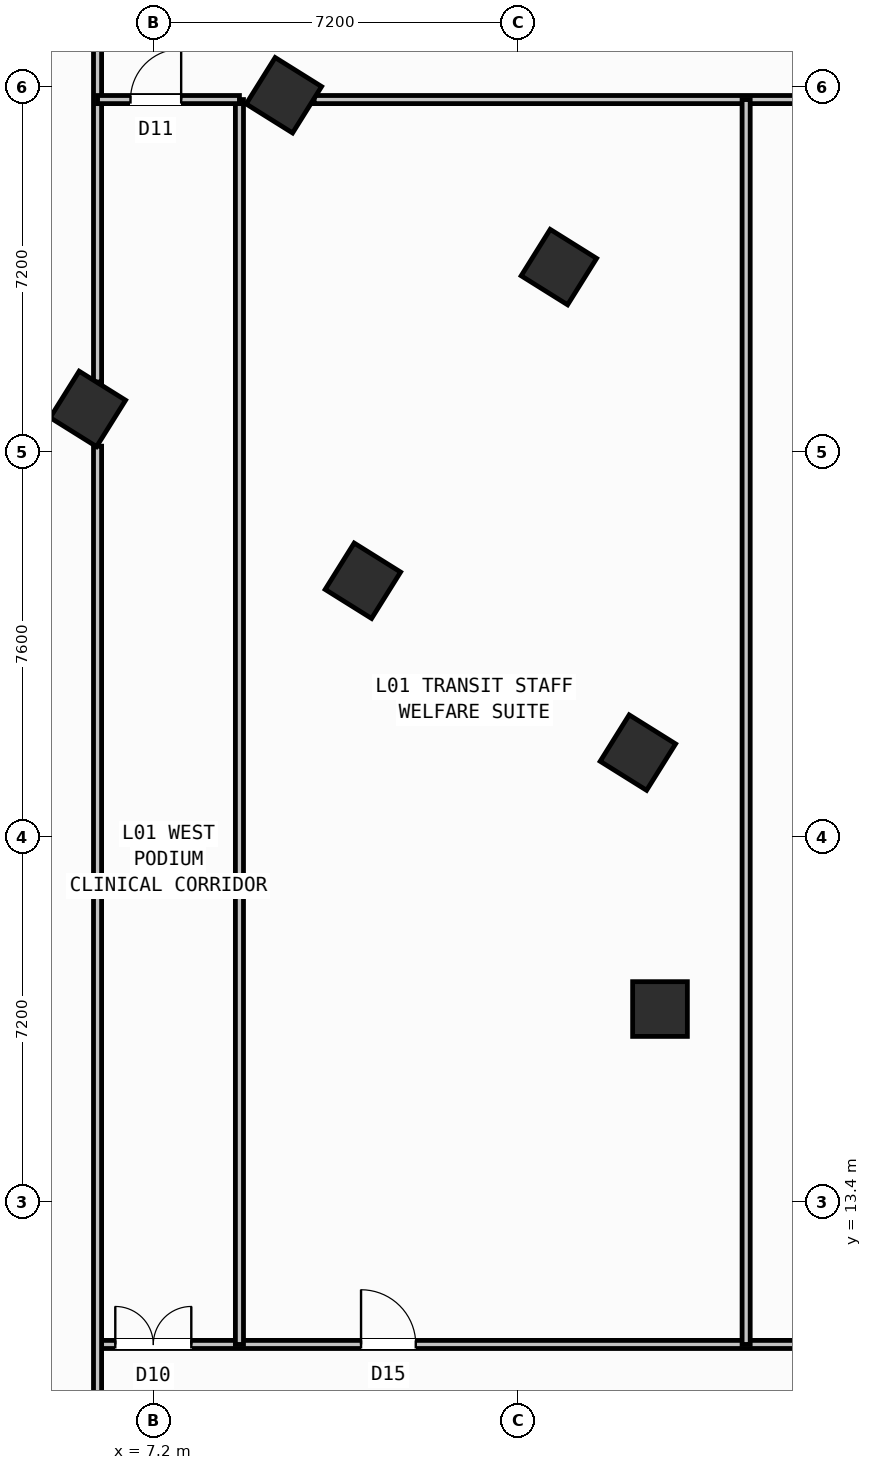
"""IFC4 building model, lengths in metres.
Left out: names, types, materials, properties, quantities, classifications, styles, units other than length and angle.
Written with IfcOpenShell. Run it as: python <this file> out.ifc"""

import sys

from ifc_helpers import new_model, si_unit, direction, frame, frame_2d, origin, origin_2d, place, context, subcontext, project, spatial, rectangle, hollow_rectangle, extrude, source, transform, mapped, element, fill, save


model = new_model("IFC4")
c1 = context("Model", 3, precision=1e-05, world=origin(), true_north=direction((0.0, 1.0)))
c2 = subcontext(c1, "Body", "Model", "MODEL_VIEW")
j1 = project(units=[si_unit("LENGTHUNIT", "METRE"), si_unit("PLANEANGLEUNIT", "RADIAN")], contexts=[c1])
p1 = place(None, origin())
s1 = spatial("IfcSite", under=j1, at=p1, CompositionType="ELEMENT")
p2 = place(p1, origin())
s2 = spatial("IfcBuilding", under=s1, at=p2, CompositionType="ELEMENT")
p3 = place(p2, frame((0.0, 0.0, 5.4)))
s3 = spatial("IfcBuildingStorey", under=s2, at=p3, CompositionType="ELEMENT", Elevation=5.4)
m1 = source(origin(), c2, "Body", "SweptSolid", [
    extrude(hollow_rectangle(XDim=1.08, YDim=1.08, WallThickness=0.04, at=origin_2d()), origin(), (0.0, 0.0, 1.0), 4.8),
])
for number, where, z_axis, x_axis in (
    (1, (17.2, 17.2, 0.0), (0.0, 0.0, 1.0), (1.0, 0.0, 0.0)),
    (2, (16.764, 22.261, 0.0), (0.0, 0.0, 1.0), (-0.848, 0.53, 0.0)),
    (3, (15.205, 31.844, 0.0), (0.0, 0.0, 1.0), (-0.848, 0.53, 0.0)),
    (4, (11.336, 25.653, 0.0), (0.0, 0.0, 1.0), (-0.848, 0.53, 0.0)),
    (5, (9.777, 35.235, 0.0), (0.0, 0.0, 1.0), (-0.848, 0.53, 0.0)),
    (6, (5.909, 29.044, 0.0), (0.0, 0.0, 1.0), (-0.848, 0.53, 0.0)),
):
    element("IfcColumn", number, at=place(p3, frame(where, z_axis=z_axis, x_axis=x_axis)), inside=s3, PredefinedType="COLUMN", context=c2, shape_type="MappedRepresentation", body=[
        mapped(m1, transform((0.0, 0.0, 0.0), scale=1.0)),
    ])
p4 = place(p3, frame((6.1, 10.58, 0.0), z_axis=(0.0, 0.0, 1.0), x_axis=(1.0, 0.0, 0.0)))
e7 = element("IfcWall", 7, at=p4, inside=s3, PredefinedType="PARTITIONING", context=c2, shape_type="SweptSolid", body=[
    extrude(rectangle(XDim=62.1, YDim=0.16, at=frame_2d((31.05, 0.0))), origin(), (0.0, 0.0, 1.0), 4.44),
])
p5 = place(p4, frame((29.0, 0.0, 0.0)))
e8 = element("IfcOpeningElement", 8, at=p5, cuts=e7, PredefinedType="OPENING", context=c2, shape_type="SweptSolid", body=[
    extrude(rectangle(XDim=1.7, YDim=2.2, at=frame_2d((0.85, 1.1))), frame((0.0, 0.09, 0.0), z_axis=(0.0, -1.0, 0.0), x_axis=(1.0, 0.0, 0.0)), (0.0, 0.0, 1.0), 0.18),
])
p6 = place(p4, frame((0.35, 0.0, 0.0)))
e9 = element("IfcOpeningElement", 9, at=p6, cuts=e7, PredefinedType="OPENING", context=c2, shape_type="SweptSolid", body=[
    extrude(rectangle(XDim=1.5, YDim=2.15, at=frame_2d((0.75, 1.075))), frame((0.0, 0.09, 0.0), z_axis=(0.0, -1.0, 0.0), x_axis=(1.0, 0.0, 0.0)), (0.0, 0.0, 1.0), 0.18),
])
p7 = place(p4, frame((5.2, 0.0, 0.0)))
e10 = element("IfcOpeningElement", 10, at=p7, cuts=e7, PredefinedType="OPENING", context=c2, shape_type="SweptSolid", body=[
    extrude(rectangle(XDim=1.08, YDim=2.15, at=frame_2d((0.54, 1.075))), frame((0.0, 0.09, 0.0), z_axis=(0.0, -1.0, 0.0), x_axis=(1.0, 0.0, 0.0)), (0.0, 0.0, 1.0), 0.18),
])
p8 = place(p4, frame((58.5, 0.0, 0.0)))
e11 = element("IfcOpeningElement", 11, at=p8, cuts=e7, PredefinedType="OPENING", context=c2, shape_type="SweptSolid", body=[
    extrude(rectangle(XDim=1.08, YDim=2.15, at=frame_2d((0.54, 1.075))), frame((0.0, 0.09, 0.0), z_axis=(0.0, -1.0, 0.0), x_axis=(1.0, 0.0, 0.0)), (0.0, 0.0, 1.0), 0.18),
])
p9 = place(p3, frame((6.1, 7.62, 0.0), z_axis=(0.0, 0.0, 1.0), x_axis=(0.0, 1.0, 0.0)))
e12 = element("IfcWall", 12, at=p9, inside=s3, PredefinedType="PARTITIONING", context=c2, shape_type="SweptSolid", body=[
    extrude(rectangle(XDim=20.689, YDim=0.16, at=frame_2d((10.344, 0.0))), origin(), (0.0, 0.0, 1.0), 4.44),
])
p10 = place(p3, frame((6.1, 29.576, 0.0), z_axis=(0.0, 0.0, 1.0), x_axis=(0.0, 1.0, 0.0)))
e13 = element("IfcWall", 13, at=p10, inside=s3, PredefinedType="PARTITIONING", context=c2, shape_type="SweptSolid", body=[
    extrude(rectangle(XDim=9.424, YDim=0.16, at=frame_2d((4.712, 0.0))), origin(), (0.0, 0.0, 1.0), 4.44),
])
p11 = place(p3, frame((8.9, 10.58, 0.0), z_axis=(0.0, 0.0, 1.0), x_axis=(0.0, 1.0, 0.0)))
e14 = element("IfcWall", 14, at=p11, inside=s3, PredefinedType="PARTITIONING", context=c2, shape_type="SweptSolid", body=[
    extrude(rectangle(XDim=24.57, YDim=0.16, at=frame_2d((12.285, 0.0))), origin(), (0.0, 0.0, 1.0), 4.44),
])
p12 = place(p3, frame((10.375, 35.15, 0.0), z_axis=(0.0, 0.0, 1.0), x_axis=(1.0, 0.0, 0.0)))
e15 = element("IfcWall", 15, at=p12, inside=s3, PredefinedType="PARTITIONING", context=c2, shape_type="SweptSolid", body=[
    extrude(rectangle(XDim=13.792, YDim=0.16, at=frame_2d((6.896, 0.0))), origin(), (0.0, 0.0, 1.0), 4.44),
])
p13 = place(p3, frame((6.1, 35.15, 0.0), z_axis=(0.0, 0.0, 1.0), x_axis=(1.0, 0.0, 0.0)))
e16 = element("IfcWall", 16, at=p13, inside=s3, PredefinedType="PARTITIONING", context=c2, shape_type="SweptSolid", body=[
    extrude(rectangle(XDim=2.8, YDim=0.16, at=frame_2d((1.4, 0.0))), origin(), (0.0, 0.0, 1.0), 4.44),
])
p14 = place(p13, frame((0.65, 0.0, 0.0)))
e17 = element("IfcOpeningElement", 17, at=p14, cuts=e16, PredefinedType="OPENING", context=c2, shape_type="SweptSolid", body=[
    extrude(rectangle(XDim=1.0, YDim=2.1, at=frame_2d((0.5, 1.05))), frame((0.0, 0.09, 0.0), z_axis=(0.0, -1.0, 0.0), x_axis=(1.0, 0.0, 0.0)), (0.0, 0.0, 1.0), 0.18),
])
p15 = place(p3, frame((18.9, 10.58, 0.0), z_axis=(0.0, 0.0, 1.0), x_axis=(0.0, 1.0, 0.0)))
e18 = element("IfcWall", 18, at=p15, inside=s3, PredefinedType="PARTITIONING", context=c2, shape_type="SweptSolid", body=[
    extrude(rectangle(XDim=24.57, YDim=0.16, at=frame_2d((12.285, 0.0))), origin(), (0.0, 0.0, 1.0), 4.44),
])
m2 = source(origin(), c2, "Body", "SweptSolid", [
    extrude(rectangle(XDim=1.5, YDim=2.15, at=frame_2d((0.75, 1.075))), frame((0.0, 0.025, 0.0), z_axis=(0.0, -1.0, 0.0), x_axis=(1.0, 0.0, 0.0)), (0.0, 0.0, 1.0), 0.05),
])
p16 = place(p6, origin())
e19 = element("IfcDoor", 19, at=p16, inside=s3, OperationType="DOUBLE_DOOR_SINGLE_SWING", PredefinedType="DOOR", context=c2, shape_type="MappedRepresentation", body=[
    mapped(m2, transform((0.0, 0.0, 0.0), scale=1.0)),
])
fill(e9, e19)
m3 = source(origin(), c2, "Body", "SweptSolid", [
    extrude(rectangle(XDim=1.0, YDim=2.1, at=frame_2d((0.5, 1.05))), frame((0.0, 0.025, 0.0), z_axis=(0.0, -1.0, 0.0), x_axis=(1.0, 0.0, 0.0)), (0.0, 0.0, 1.0), 0.05),
])
p17 = place(p14, origin())
e20 = element("IfcDoor", 20, at=p17, inside=s3, OperationType="SINGLE_SWING_RIGHT", PredefinedType="DOOR", context=c2, shape_type="MappedRepresentation", body=[
    mapped(m3, transform((0.0, 0.0, 0.0), scale=1.0)),
])
fill(e17, e20)
m4 = source(origin(), c2, "Body", "SweptSolid", [
    extrude(rectangle(XDim=1.08, YDim=2.15, at=frame_2d((0.54, 1.075))), frame((0.0, 0.025, 0.0), z_axis=(0.0, -1.0, 0.0), x_axis=(1.0, 0.0, 0.0)), (0.0, 0.0, 1.0), 0.05),
])
p18 = place(p7, origin())
e21 = element("IfcDoor", 21, at=p18, inside=s3, OperationType="SINGLE_SWING_LEFT", PredefinedType="DOOR", context=c2, shape_type="MappedRepresentation", body=[
    mapped(m4, transform((0.0, 0.0, 0.0), scale=1.0)),
])
fill(e10, e21)
save(model, sys.argv[1])
